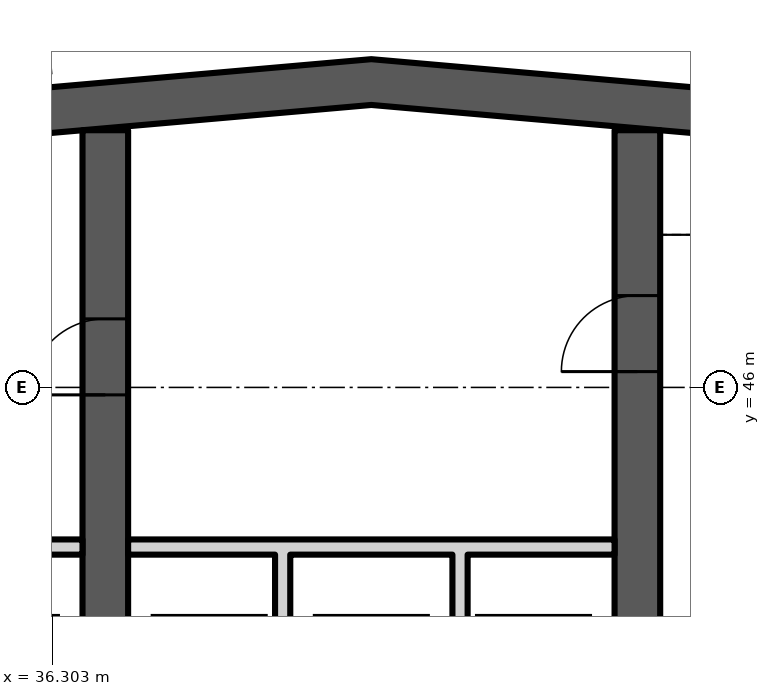
"""IFC4 building model, lengths in metres.
Left out: names, types, materials, properties, quantities, classifications, styles, units other than length and angle.
Written with IfcOpenShell. Run it as: python <this file> out.ifc"""

import sys

from ifc_helpers import new_model, si_unit, direction, frame, frame_2d, origin, place, context, subcontext, project, spatial, polyline, rectangle, outline, extrude, element, fill, save


model = new_model("IFC4")
c1 = context("Model", 3, precision=1e-05, world=origin(), true_north=direction((0.0, 1.0)))
c2 = subcontext(c1, "Body", "Model", "MODEL_VIEW")
j1 = project(units=[si_unit("LENGTHUNIT", "METRE"), si_unit("PLANEANGLEUNIT", "RADIAN")], contexts=[c1])
p1 = place(None, origin())
s1 = spatial("IfcSite", under=j1, at=p1, CompositionType="ELEMENT")
p2 = place(p1, origin())
s2 = spatial("IfcBuilding", under=s1, at=p2, CompositionType="ELEMENT")
p3 = place(p2, frame((0.0, 0.0, 232.3)))
s3 = spatial("IfcBuildingStorey", under=s2, at=p3, CompositionType="ELEMENT", Elevation=232.3)
p4 = place(p3, frame((0.0, 0.0, -0.0)))
e1 = element("IfcWall", 1, at=p4, inside=s3, PredefinedType="SHEAR", context=c2, shape_type="SweptSolid", body=[
    extrude(outline(polyline([(23.0, 48.185), (40.5, 49.716), (58.0, 48.185), (58.0, 48.787), (40.5, 50.318), (23.0, 48.787), (23.0, 48.185)])), origin(), (0.0, 0.0, 1.0), 3.6),
])
p5 = place(p3, frame((37.0, 34.6, 0.0), z_axis=(0.0, 0.0, 1.0), x_axis=(0.0, 1.0, 0.0)))
e2 = element("IfcWall", 2, at=p5, inside=s3, PredefinedType="SHEAR", context=c2, shape_type="SweptSolid", body=[
    extrude(rectangle(XDim=14.784, YDim=0.6, at=frame_2d((7.392, 0.0))), origin(), (0.0, 0.0, 1.0), 3.6),
])
p6 = place(p5, frame((11.302, 0.0, 0.0)))
e3 = element("IfcOpeningElement", 3, at=p6, cuts=e2, PredefinedType="OPENING", context=c2, shape_type="SweptSolid", body=[
    extrude(rectangle(XDim=1.0, YDim=2.1, at=frame_2d((0.5, 1.05))), frame((0.0, 0.31, 0.0), z_axis=(0.0, -1.0, 0.0), x_axis=(1.0, 0.0, 0.0)), (0.0, 0.0, 1.0), 0.62),
])
p7 = place(p5, frame((3.8, 0.0, 0.0)))
e4 = element("IfcOpeningElement", 4, at=p7, cuts=e2, PredefinedType="OPENING", context=c2, shape_type="SweptSolid", body=[
    extrude(rectangle(XDim=1.1, YDim=2.1, at=frame_2d((0.55, 1.05))), frame((0.0, 0.31, 0.0), z_axis=(0.0, -1.0, 0.0), x_axis=(1.0, 0.0, 0.0)), (0.0, 0.0, 1.0), 0.62),
])
p8 = place(p3, frame((44.0, 34.6, 0.0), z_axis=(0.0, 0.0, 1.0), x_axis=(0.0, 1.0, 0.0)))
e5 = element("IfcWall", 5, at=p8, inside=s3, PredefinedType="SHEAR", context=c2, shape_type="SweptSolid", body=[
    extrude(rectangle(XDim=14.784, YDim=0.6, at=frame_2d((7.392, 0.0))), origin(), (0.0, 0.0, 1.0), 3.6),
])
p9 = place(p8, frame((11.608, 0.0, 0.0)))
e6 = element("IfcOpeningElement", 6, at=p9, cuts=e5, PredefinedType="OPENING", context=c2, shape_type="SweptSolid", body=[
    extrude(rectangle(XDim=1.0, YDim=2.1, at=frame_2d((0.5, 1.05))), frame((0.0, 0.31, 0.0), z_axis=(0.0, -1.0, 0.0), x_axis=(1.0, 0.0, 0.0)), (0.0, 0.0, 1.0), 0.62),
])
p10 = place(p8, frame((3.8, 0.0, 0.0)))
e7 = element("IfcOpeningElement", 7, at=p10, cuts=e5, PredefinedType="OPENING", context=c2, shape_type="SweptSolid", body=[
    extrude(rectangle(XDim=1.1, YDim=2.1, at=frame_2d((0.55, 1.05))), frame((0.0, 0.31, 0.0), z_axis=(0.0, -1.0, 0.0), x_axis=(1.0, 0.0, 0.0)), (0.0, 0.0, 1.0), 0.62),
])
p11 = place(p3, frame((0.0, 0.0, -0.0)))
e8 = element("IfcWall", 8, at=p11, inside=s3, PredefinedType="PARTITIONING", context=c2, shape_type="SweptSolid", body=[
    extrude(outline(polyline([(32.433, 40.8), (32.233, 40.8), (32.233, 43.8), (30.3, 43.8), (30.3, 44.0), (36.7, 44.0), (36.7, 43.8), (34.767, 43.8), (34.767, 40.8), (34.567, 40.8), (34.567, 43.8), (32.433, 43.8), (32.433, 40.8)])), origin(), (0.0, 0.0, 1.0), 3.2),
])
p12 = place(p3, frame((0.0, 0.0, -0.0)))
e9 = element("IfcWall", 9, at=p12, inside=s3, PredefinedType="PARTITIONING", context=c2, shape_type="SweptSolid", body=[
    extrude(outline(polyline([(39.433, 40.8), (39.233, 40.8), (39.233, 43.8), (37.3, 43.8), (37.3, 44.0), (43.7, 44.0), (43.7, 43.8), (41.767, 43.8), (41.767, 40.8), (41.567, 40.8), (41.567, 43.8), (39.433, 43.8), (39.433, 40.8)])), origin(), (0.0, 0.0, 1.0), 3.2),
])
p13 = place(p6, origin())
e10 = element("IfcDoor", 10, at=p13, inside=s3, OperationType="SINGLE_SWING_LEFT", PredefinedType="DOOR", context=c2, shape_type="SweptSolid", body=[
    extrude(rectangle(XDim=1.0, YDim=2.1, at=frame_2d((0.5, 1.05))), frame((0.0, 0.025, 0.0), z_axis=(0.0, -1.0, 0.0), x_axis=(1.0, 0.0, 0.0)), (0.0, 0.0, 1.0), 0.05),
])
fill(e3, e10)
p14 = place(p9, origin())
e11 = element("IfcDoor", 11, at=p14, inside=s3, OperationType="SINGLE_SWING_LEFT", PredefinedType="DOOR", context=c2, shape_type="SweptSolid", body=[
    extrude(rectangle(XDim=1.0, YDim=2.1, at=frame_2d((0.5, 1.05))), frame((0.0, 0.025, 0.0), z_axis=(0.0, -1.0, 0.0), x_axis=(1.0, 0.0, 0.0)), (0.0, 0.0, 1.0), 0.05),
])
fill(e6, e11)
save(model, sys.argv[1])
